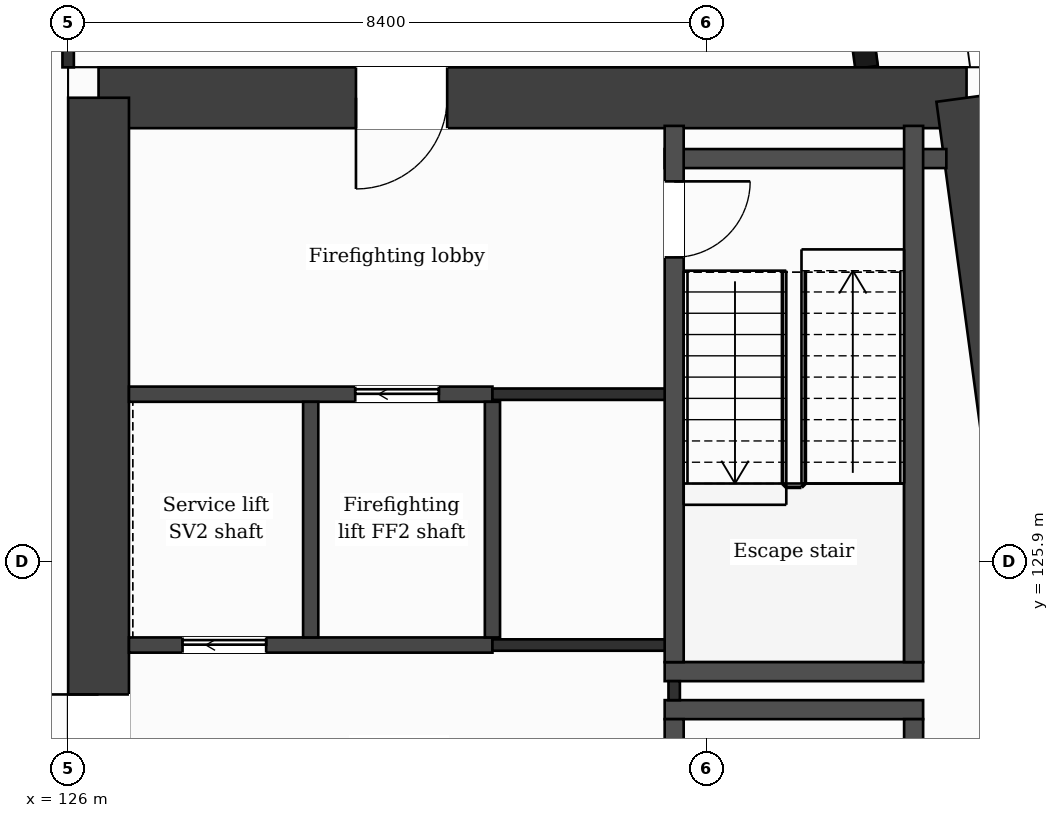
"""IFC4 building model, lengths in metres.
Left out: names, types, materials, properties, quantities, classifications, styles, units other than length and angle.
Written with IfcOpenShell. Run it as: python <this file> out.ifc"""

import sys

from ifc_helpers import new_model, si_unit, direction, frame, frame_2d, origin, place, context, subcontext, project, spatial, rectangle, extrude, element, fill, save


model = new_model("IFC4")
c1 = context("Model", 3, precision=1e-05, world=origin(), true_north=direction((0.0, 1.0)))
c2 = subcontext(c1, "Body", "Model", "MODEL_VIEW")
j1 = project(units=[si_unit("LENGTHUNIT", "METRE"), si_unit("PLANEANGLEUNIT", "RADIAN")], contexts=[c1])
p1 = place(None, origin())
s1 = spatial("IfcSite", under=j1, at=p1, CompositionType="ELEMENT")
p2 = place(p1, origin())
s2 = spatial("IfcBuilding", under=s1, at=p2, CompositionType="ELEMENT")
p3 = place(p2, frame((0.0, 0.0, 228.1)))
s3 = spatial("IfcBuildingStorey", under=s2, at=p3, CompositionType="ELEMENT", Elevation=228.1)
p4 = place(p3, frame((126.4, 132.0, 0.0), z_axis=(0.0, 0.0, 1.0), x_axis=(1.0, 0.0, 0.0)))
e1 = element("IfcWall", 1, at=p4, inside=s3, PredefinedType="SHEAR", context=c2, shape_type="SweptSolid", body=[
    extrude(rectangle(XDim=11.42, YDim=0.8, at=frame_2d((5.71, 0.0))), origin(), (0.0, 0.0, 1.0), 3.7),
])
p5 = place(p4, frame((3.386, 0.0, 0.0)))
e2 = element("IfcOpeningElement", 2, at=p5, cuts=e1, PredefinedType="OPENING", context=c2, shape_type="SweptSolid", body=[
    extrude(rectangle(XDim=1.2, YDim=2.1, at=frame_2d((0.6, 1.05))), frame((0.0, 0.41, 0.0), z_axis=(0.0, -1.0, 0.0), x_axis=(1.0, 0.0, 0.0)), (0.0, 0.0, 1.0), 0.82),
])
p6 = place(p3, frame((137.82, 132.0, 0.0), z_axis=(0.0, 0.0, 1.0), x_axis=(0.133408347329, -0.991061154956, 0.0)))
e3 = element("IfcWall", 3, at=p6, inside=s3, PredefinedType="SHEAR", context=c2, shape_type="SweptSolid", body=[
    extrude(rectangle(XDim=21.391, YDim=0.8, at=frame_2d((10.696, 0.0))), origin(), (0.0, 0.0, 1.0), 3.7),
])
p7 = place(p3, frame((126.4, 110.8, 0.0), z_axis=(0.0, 0.0, 1.0), x_axis=(0.0, 1.0, 0.0)))
e4 = element("IfcWall", 4, at=p7, inside=s3, PredefinedType="SHEAR", context=c2, shape_type="SweptSolid", body=[
    extrude(rectangle(XDim=21.2, YDim=0.8, at=frame_2d((10.6, 0.0))), origin(), (0.0, 0.0, 1.0), 3.7),
])
p8 = place(p7, frame((11.95, 0.0, 0.0)))
e5 = element("IfcOpeningElement", 5, at=p8, cuts=e4, PredefinedType="OPENING", context=c2, shape_type="SweptSolid", body=[
    extrude(rectangle(XDim=1.4, YDim=2.1, at=frame_2d((0.7, 1.05))), frame((0.0, 0.41, 0.0), z_axis=(0.0, -1.0, 0.0), x_axis=(1.0, 0.0, 0.0)), (0.0, 0.0, 1.0), 0.82),
])
p9 = place(p3, frame((136.504, 132.4, 0.0), z_axis=(0.0, 0.0, 1.0), x_axis=(-0.133399697462, 0.99106231929, 0.0)))
e6 = element("IfcWall", 6, at=p9, inside=s3, PredefinedType="SOLIDWALL", context=c2, shape_type="SweptSolid", body=[
    extrude(rectangle(XDim=6.74, YDim=0.3, at=frame_2d((3.37, 0.0))), origin(), (0.0, 0.0, 1.0), 3.38),
])
p10 = place(p9, frame((1.115, 0.0, 0.0)))
e7 = element("IfcOpeningElement", 7, at=p10, cuts=e6, PredefinedType="OPENING", context=c2, shape_type="SweptSolid", body=[
    extrude(rectangle(XDim=1.2, YDim=2.4, at=frame_2d((0.6, 1.2))), frame((0.0, 0.16, 0.0), z_axis=(0.0, -1.0, 0.0), x_axis=(1.0, 0.0, 0.0)), (0.0, 0.0, 1.0), 0.32),
])
p11 = place(p9, frame((3.835, 0.0, 0.9)))
e8 = element("IfcOpeningElement", 8, at=p11, cuts=e6, PredefinedType="OPENING", context=c2, shape_type="SweptSolid", body=[
    extrude(rectangle(XDim=2.4, YDim=2.1, at=frame_2d((1.2, 1.05))), frame((0.0, 0.16, 0.0), z_axis=(0.0, -1.0, 0.0), x_axis=(1.0, 0.0, 0.0)), (0.0, 0.0, 1.0), 0.32),
])
for number, where, z_axis, x_axis in (
    (9, (133.848, 123.95, 0.0), (0.0, 0.0, 1.0), (1.0, 0.0, 0.0)),
    (10, (133.848, 124.45, 0.0), (0.0, 0.0, 1.0), (1.0, 0.0, 0.0)),
):
    element("IfcWall", number, at=place(p3, frame(where, z_axis=z_axis, x_axis=x_axis)), inside=s3, PredefinedType="PARTITIONING", context=c2, shape_type="SweptSolid", body=[
        extrude(rectangle(XDim=3.4, YDim=0.25, at=frame_2d((1.7, 0.0))), origin(), (0.0, 0.0, 1.0), 3.38),
    ])
p12 = place(p3, frame((126.8, 124.8, 0.0), z_axis=(0.0, 0.0, 1.0), x_axis=(1.0, 0.0, 0.0)))
e11 = element("IfcWall", 11, at=p12, inside=s3, PredefinedType="PARTITIONING", context=c2, shape_type="SweptSolid", body=[
    extrude(rectangle(XDim=4.782, YDim=0.2, at=frame_2d((2.391, 0.0))), origin(), (0.0, 0.0, 1.0), 3.38),
])
p13 = place(p12, frame((0.705, 0.0, 0.0)))
e12 = element("IfcOpeningElement", 12, at=p13, cuts=e11, PredefinedType="OPENING", context=c2, shape_type="SweptSolid", body=[
    extrude(rectangle(XDim=1.1, YDim=2.1, at=frame_2d((0.55, 1.05))), frame((0.0, 0.11, 0.0), z_axis=(0.0, -1.0, 0.0), x_axis=(1.0, 0.0, 0.0)), (0.0, 0.0, 1.0), 0.22),
])
p14 = place(p3, frame((131.582, 124.8, 0.0), z_axis=(0.0, 0.0, 1.0), x_axis=(1.0, 0.0, 0.0)))
e13 = element("IfcWall", 13, at=p14, inside=s3, PredefinedType="PARTITIONING", context=c2, shape_type="SweptSolid", body=[
    extrude(rectangle(XDim=2.516, YDim=0.15, at=frame_2d((1.258, 0.0))), origin(), (0.0, 0.0, 1.0), 3.38),
])
p15 = place(p3, frame((126.8, 128.1, 0.0), z_axis=(0.0, 0.0, 1.0), x_axis=(1.0, 0.0, 0.0)))
e14 = element("IfcWall", 14, at=p15, inside=s3, PredefinedType="PARTITIONING", context=c2, shape_type="SweptSolid", body=[
    extrude(rectangle(XDim=4.782, YDim=0.2, at=frame_2d((2.391, 0.0))), origin(), (0.0, 0.0, 1.0), 3.38),
])
p16 = place(p15, frame((2.977, 0.0, 0.0)))
e15 = element("IfcOpeningElement", 15, at=p16, cuts=e14, PredefinedType="OPENING", context=c2, shape_type="SweptSolid", body=[
    extrude(rectangle(XDim=1.1, YDim=2.1, at=frame_2d((0.55, 1.05))), frame((0.0, 0.11, 0.0), z_axis=(0.0, -1.0, 0.0), x_axis=(1.0, 0.0, 0.0)), (0.0, 0.0, 1.0), 0.22),
])
p17 = place(p3, frame((131.582, 128.1, 0.0), z_axis=(0.0, 0.0, 1.0), x_axis=(1.0, 0.0, 0.0)))
e16 = element("IfcWall", 16, at=p17, inside=s3, PredefinedType="PARTITIONING", context=c2, shape_type="SweptSolid", body=[
    extrude(rectangle(XDim=2.391, YDim=0.15, at=frame_2d((1.195, 0.0))), origin(), (0.0, 0.0, 1.0), 3.38),
])
p18 = place(p3, frame((133.848, 131.2, 0.0), z_axis=(0.0, 0.0, 1.0), x_axis=(1.0, 0.0, 0.0)))
e17 = element("IfcWall", 17, at=p18, inside=s3, PredefinedType="PARTITIONING", context=c2, shape_type="SweptSolid", body=[
    extrude(rectangle(XDim=3.706, YDim=0.25, at=frame_2d((1.853, 0.0))), origin(), (0.0, 0.0, 1.0), 3.38),
])
p19 = place(p3, frame((126.0, 132.4, 0.0), z_axis=(0.0, 0.0, 1.0), x_axis=(0.0, 1.0, 0.0)))
e18 = element("IfcWall", 18, at=p19, inside=s3, PredefinedType="PARTITIONING", context=c2, shape_type="SweptSolid", body=[
    extrude(rectangle(XDim=1.325, YDim=0.15, at=frame_2d((0.663, 0.0))), origin(), (0.0, 0.0, 1.0), 3.38),
])
for number, where, z_axis, x_axis in (
    (19, (129.191, 124.9, 0.0), (0.0, 0.0, 1.0), (0.0, 1.0, 0.0)),
    (20, (131.582, 124.9, 0.0), (0.0, 0.0, 1.0), (0.0, 1.0, 0.0)),
):
    element("IfcWall", number, at=place(p3, frame(where, z_axis=z_axis, x_axis=x_axis)), inside=s3, PredefinedType="PARTITIONING", context=c2, shape_type="SweptSolid", body=[
        extrude(rectangle(XDim=3.1, YDim=0.2, at=frame_2d((1.55, 0.0))), origin(), (0.0, 0.0, 1.0), 3.38),
    ])
p20 = place(p3, frame((133.973, 124.075, 0.0), z_axis=(0.0, 0.0, 1.0), x_axis=(0.0, 1.0, 0.0)))
e21 = element("IfcWall", 21, at=p20, inside=s3, PredefinedType="PARTITIONING", context=c2, shape_type="SweptSolid", body=[
    extrude(rectangle(XDim=0.25, YDim=0.15, at=frame_2d((0.125, 0.0))), origin(), (0.0, 0.0, 1.0), 3.38),
])
p21 = place(p3, frame((133.973, 116.77, 0.0), z_axis=(0.0, 0.0, 1.0), x_axis=(0.0, 1.0, 0.0)))
e22 = element("IfcWall", 22, at=p21, inside=s3, PredefinedType="PARTITIONING", context=c2, shape_type="SweptSolid", body=[
    extrude(rectangle(XDim=7.055, YDim=0.25, at=frame_2d((3.527, 0.0))), origin(), (0.0, 0.0, 1.0), 3.38),
])
p22 = place(p21, frame((5.755, 0.0, 0.0)))
e23 = element("IfcOpeningElement", 23, at=p22, cuts=e22, PredefinedType="OPENING", context=c2, shape_type="SweptSolid", body=[
    extrude(rectangle(XDim=0.95, YDim=2.1, at=frame_2d((0.475, 1.05))), frame((0.0, 0.135, 0.0), z_axis=(0.0, -1.0, 0.0), x_axis=(1.0, 0.0, 0.0)), (0.0, 0.0, 1.0), 0.27),
])
p23 = place(p3, frame((133.973, 124.575, 0.0), z_axis=(0.0, 0.0, 1.0), x_axis=(0.0, 1.0, 0.0)))
e24 = element("IfcWall", 24, at=p23, inside=s3, PredefinedType="PARTITIONING", context=c2, shape_type="SweptSolid", body=[
    extrude(rectangle(XDim=7.055, YDim=0.25, at=frame_2d((3.527, 0.0))), origin(), (0.0, 0.0, 1.0), 3.38),
])
p24 = place(p23, frame((5.325, 0.0, 0.0)))
e25 = element("IfcOpeningElement", 25, at=p24, cuts=e24, PredefinedType="OPENING", context=c2, shape_type="SweptSolid", body=[
    extrude(rectangle(XDim=1.0, YDim=2.1, at=frame_2d((0.5, 1.05))), frame((0.0, 0.135, 0.0), z_axis=(0.0, -1.0, 0.0), x_axis=(1.0, 0.0, 0.0)), (0.0, 0.0, 1.0), 0.27),
])
for number, where, z_axis, x_axis in (
    (26, (137.123, 116.77, 0.0), (0.0, 0.0, 1.0), (0.0, 1.0, 0.0)),
    (27, (137.123, 124.575, 0.0), (0.0, 0.0, 1.0), (0.0, 1.0, 0.0)),
):
    element("IfcWall", number, at=place(p3, frame(where, z_axis=z_axis, x_axis=x_axis)), inside=s3, PredefinedType="PARTITIONING", context=c2, shape_type="SweptSolid", body=[
        extrude(rectangle(XDim=7.055, YDim=0.25, at=frame_2d((3.527, 0.0))), origin(), (0.0, 0.0, 1.0), 3.38),
    ])
p25 = place(p16, origin())
e28 = element("IfcDoor", 28, at=p25, inside=s3, OperationType="SLIDING_TO_LEFT", PredefinedType="DOOR", context=c2, shape_type="SweptSolid", body=[
    extrude(rectangle(XDim=1.1, YDim=2.1, at=frame_2d((0.55, 1.05))), frame((0.0, 0.025, 0.0), z_axis=(0.0, -1.0, 0.0), x_axis=(1.0, 0.0, 0.0)), (0.0, 0.0, 1.0), 0.05),
])
fill(e15, e28)
p26 = place(p13, origin())
e29 = element("IfcDoor", 29, at=p26, inside=s3, OperationType="SLIDING_TO_LEFT", PredefinedType="DOOR", context=c2, shape_type="SweptSolid", body=[
    extrude(rectangle(XDim=1.1, YDim=2.1, at=frame_2d((0.55, 1.05))), frame((0.0, 0.025, 0.0), z_axis=(0.0, -1.0, 0.0), x_axis=(1.0, 0.0, 0.0)), (0.0, 0.0, 1.0), 0.05),
])
fill(e12, e29)
p27 = place(p24, origin())
e30 = element("IfcDoor", 30, at=p27, inside=s3, OperationType="SINGLE_SWING_RIGHT", PredefinedType="DOOR", context=c2, shape_type="SweptSolid", body=[
    extrude(rectangle(XDim=1.0, YDim=2.1, at=frame_2d((0.5, 1.05))), frame((0.0, 0.025, 0.0), z_axis=(0.0, -1.0, 0.0), x_axis=(1.0, 0.0, 0.0)), (0.0, 0.0, 1.0), 0.05),
])
fill(e25, e30)
p28 = place(p5, origin())
e31 = element("IfcDoor", 31, at=p28, inside=s3, OperationType="SINGLE_SWING_LEFT", PredefinedType="DOOR", context=c2, shape_type="SweptSolid", body=[
    extrude(rectangle(XDim=1.2, YDim=2.1, at=frame_2d((0.6, 1.05))), frame((0.0, 0.025, 0.0), z_axis=(0.0, -1.0, 0.0), x_axis=(1.0, 0.0, 0.0)), (0.0, 0.0, 1.0), 0.05),
])
fill(e2, e31)
p29 = place(p8, origin())
e32 = element("IfcDoor", 32, at=p29, inside=s3, OperationType="SINGLE_SWING_RIGHT", PredefinedType="DOOR", context=c2, shape_type="SweptSolid", body=[
    extrude(rectangle(XDim=1.4, YDim=2.1, at=frame_2d((0.7, 1.05))), frame((0.0, 0.025, 0.0), z_axis=(0.0, -1.0, 0.0), x_axis=(1.0, 0.0, 0.0)), (0.0, 0.0, 1.0), 0.05),
])
fill(e5, e32)
save(model, sys.argv[1])
